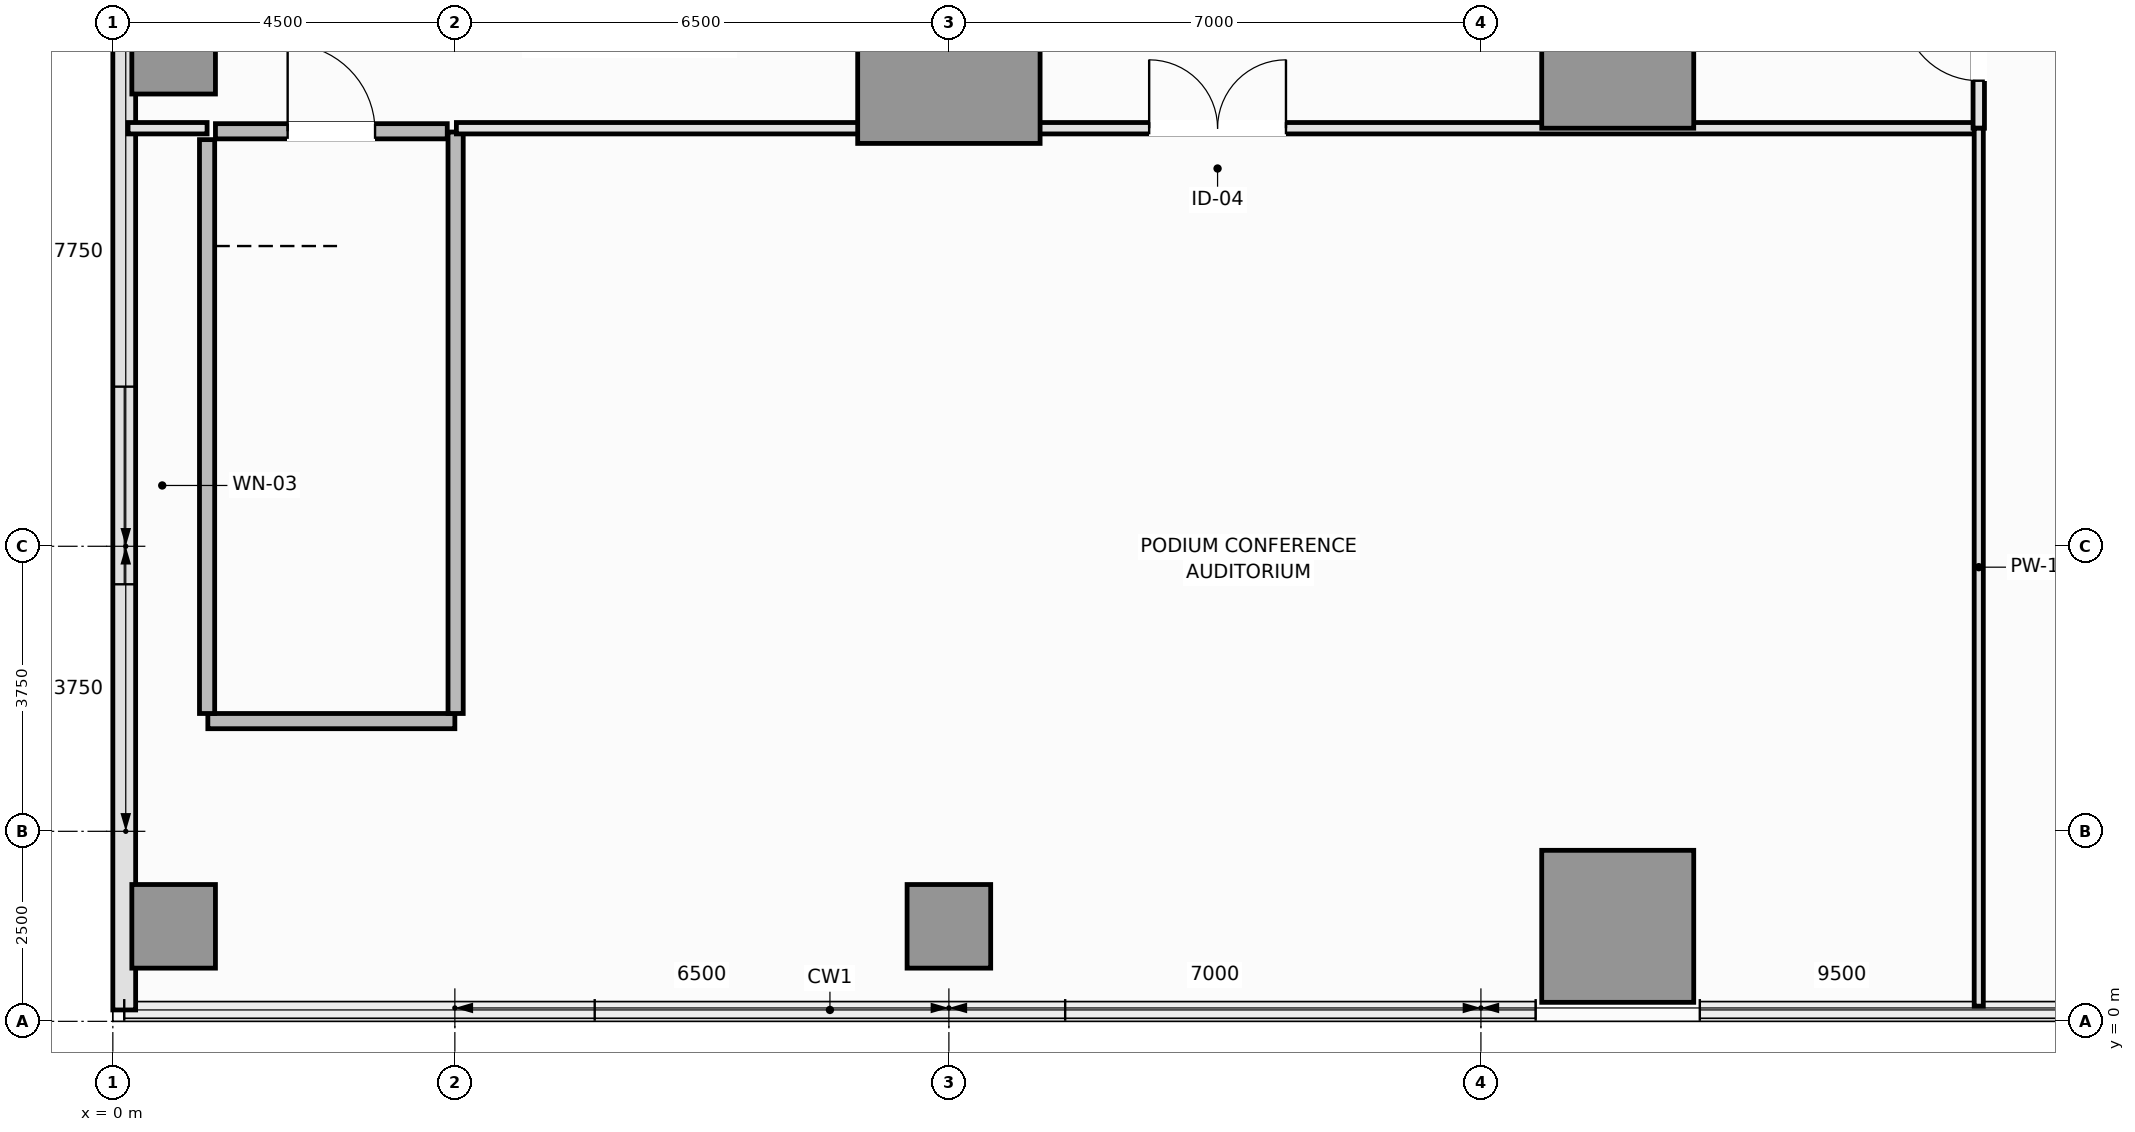
"""IFC4 building model, lengths in metres.
Left out: names, types, materials, properties, quantities, classifications, styles, units other than length and angle.
Written with IfcOpenShell. Run it as: python <this file> out.ifc"""

import sys

from ifc_helpers import new_model, si_unit, direction, frame, frame_2d, origin, origin_2d, place, context, subcontext, project, spatial, rectangle, extrude, element, fill, save


model = new_model("IFC4")
c1 = context("Model", 3, precision=1e-05, world=origin(), true_north=direction((0.0, 1.0)))
c2 = subcontext(c1, "Body", "Model", "MODEL_VIEW")
j1 = project(units=[si_unit("LENGTHUNIT", "METRE"), si_unit("PLANEANGLEUNIT", "RADIAN")], contexts=[c1])
p1 = place(None, origin())
s1 = spatial("IfcSite", under=j1, at=p1, CompositionType="ELEMENT")
p2 = place(p1, origin())
s2 = spatial("IfcBuilding", under=s1, at=p2, CompositionType="ELEMENT")
p3 = place(p2, frame((0.0, 0.0, 20.4)))
s3 = spatial("IfcBuildingStorey", under=s2, at=p3, CompositionType="ELEMENT", Elevation=20.4)
p4 = place(p3, frame((11.0, 12.75, 0.0), z_axis=(0.0, 0.0, 1.0), x_axis=(1.0, 0.0, 0.0)))
e1 = element("IfcColumn", 1, at=p4, inside=s3, PredefinedType="COLUMN", context=c2, shape_type="SweptSolid", body=[
    extrude(rectangle(XDim=2.4, YDim=2.4, at=origin_2d()), origin(), (0.0, 0.0, 1.0), 5.2),
])
for number, where, z_axis, x_axis in (
    (2, (19.8, 1.25, 0.0), (0.0, 0.0, 1.0), (1.0, 0.0, 0.0)),
    (3, (19.8, 12.75, 0.0), (0.0, 0.0, 1.0), (1.0, 0.0, 0.0)),
):
    element("IfcColumn", number, at=place(p3, frame(where, z_axis=z_axis, x_axis=x_axis)), inside=s3, PredefinedType="COLUMN", context=c2, shape_type="SweptSolid", body=[
        extrude(rectangle(XDim=2.0, YDim=2.0, at=origin_2d()), origin(), (0.0, 0.0, 1.0), 5.2),
    ])
for number, where, z_axis, x_axis in (
    (4, (0.8, 1.25, 0.0), (0.0, 0.0, 1.0), (1.0, 0.0, 0.0)),
    (5, (0.8, 12.75, 0.0), (0.0, 0.0, 1.0), (1.0, 0.0, 0.0)),
    (6, (11.0, 1.25, 0.0), (0.0, 0.0, 1.0), (1.0, 0.0, 0.0)),
):
    element("IfcColumn", number, at=place(p3, frame(where, z_axis=z_axis, x_axis=x_axis)), inside=s3, PredefinedType="COLUMN", context=c2, shape_type="SweptSolid", body=[
        extrude(rectangle(XDim=1.1, YDim=1.1, at=origin_2d()), origin(), (0.0, 0.0, 1.0), 5.2),
    ])
p5 = place(p3, frame((0.15, 50.35, 0.0), z_axis=(0.0, 0.0, 1.0), x_axis=(0.0, -1.0, 0.0)))
e7 = element("IfcWall", 7, at=p5, inside=s3, PredefinedType="SOLIDWALL", context=c2, shape_type="SweptSolid", body=[
    extrude(rectangle(XDim=50.2, YDim=0.3, at=frame_2d((25.1, 0.0))), origin(), (0.0, 0.0, 1.0), 5.02),
])
p6 = place(p5, frame((6.5, 0.0, 0.9)))
e8 = element("IfcOpeningElement", 8, at=p6, cuts=e7, PredefinedType="OPENING", context=c2, shape_type="SweptSolid", body=[
    extrude(rectangle(XDim=2.6, YDim=2.2, at=frame_2d((1.3, 1.1))), frame((0.0, 0.16, 0.0), z_axis=(0.0, -1.0, 0.0), x_axis=(1.0, 0.0, 0.0)), (0.0, 0.0, 1.0), 0.32),
])
p7 = place(p5, frame((42.0, 0.0, 0.9)))
e9 = element("IfcOpeningElement", 9, at=p7, cuts=e7, PredefinedType="OPENING", context=c2, shape_type="SweptSolid", body=[
    extrude(rectangle(XDim=2.6, YDim=2.2, at=frame_2d((1.3, 1.1))), frame((0.0, 0.16, 0.0), z_axis=(0.0, -1.0, 0.0), x_axis=(1.0, 0.0, 0.0)), (0.0, 0.0, 1.0), 0.32),
])
p8 = place(p3, frame((1.25, 3.95, 0.0), z_axis=(0.0, 0.0, 1.0), x_axis=(1.0, 0.0, 0.0)))
e10 = element("IfcWall", 10, at=p8, inside=s3, PredefinedType="SOLIDWALL", context=c2, shape_type="SweptSolid", body=[
    extrude(rectangle(XDim=3.25, YDim=0.2, at=frame_2d((1.625, 0.0))), origin(), (0.0, 0.0, 1.0), 5.2),
])
p9 = place(p3, frame((1.24, 4.05, 0.0), z_axis=(0.0, 0.0, 1.0), x_axis=(0.0, 1.0, 0.0)))
e11 = element("IfcWall", 11, at=p9, inside=s3, PredefinedType="SOLIDWALL", context=c2, shape_type="SweptSolid", body=[
    extrude(rectangle(XDim=7.55, YDim=0.2, at=frame_2d((3.775, 0.0))), origin(), (0.0, 0.0, 1.0), 5.2),
])
p10 = place(p3, frame((4.51, 4.05, 0.0), z_axis=(0.0, 0.0, 1.0), x_axis=(0.0, 1.0, 0.0)))
e12 = element("IfcWall", 12, at=p10, inside=s3, PredefinedType="SOLIDWALL", context=c2, shape_type="SweptSolid", body=[
    extrude(rectangle(XDim=7.65, YDim=0.2, at=frame_2d((3.825, 0.0))), origin(), (0.0, 0.0, 1.0), 5.2),
])
p11 = place(p3, frame((1.35, 11.71, 0.0), z_axis=(0.0, 0.0, 1.0), x_axis=(1.0, 0.0, 0.0)))
e13 = element("IfcWall", 13, at=p11, inside=s3, PredefinedType="SOLIDWALL", context=c2, shape_type="SweptSolid", body=[
    extrude(rectangle(XDim=3.05, YDim=0.2, at=frame_2d((1.525, 0.0))), origin(), (0.0, 0.0, 1.0), 5.2),
])
p12 = place(p11, frame((0.95, 0.0, 0.0)))
e14 = element("IfcOpeningElement", 14, at=p12, cuts=e13, PredefinedType="OPENING", context=c2, shape_type="SweptSolid", body=[
    extrude(rectangle(XDim=1.15, YDim=2.15, at=frame_2d((0.575, 1.075))), frame((0.0, 0.11, 0.0), z_axis=(0.0, -1.0, 0.0), x_axis=(1.0, 0.0, 0.0)), (0.0, 0.0, 1.0), 0.22),
])
p13 = place(p3, frame((0.2, 11.75, 0.0), z_axis=(0.0, 0.0, 1.0), x_axis=(1.0, 0.0, 0.0)))
e15 = element("IfcWall", 15, at=p13, inside=s3, PredefinedType="PARTITIONING", context=c2, shape_type="SweptSolid", body=[
    extrude(rectangle(XDim=1.04, YDim=0.15, at=frame_2d((0.52, 0.0))), origin(), (0.0, 0.0, 1.0), 5.02),
])
p14 = place(p3, frame((4.52, 11.75, 0.0), z_axis=(0.0, 0.0, 1.0), x_axis=(1.0, 0.0, 0.0)))
e16 = element("IfcWall", 16, at=p14, inside=s3, PredefinedType="PARTITIONING", context=c2, shape_type="SweptSolid", body=[
    extrude(rectangle(XDim=20.03, YDim=0.15, at=frame_2d((10.015, 0.0))), origin(), (0.0, 0.0, 1.0), 5.02),
])
p15 = place(p14, frame((9.115, 0.0, 0.0)))
e17 = element("IfcOpeningElement", 17, at=p15, cuts=e16, PredefinedType="OPENING", context=c2, shape_type="SweptSolid", body=[
    extrude(rectangle(XDim=1.8, YDim=2.2, at=frame_2d((0.9, 1.1))), frame((0.0, 0.085, 0.0), z_axis=(0.0, -1.0, 0.0), x_axis=(1.0, 0.0, 0.0)), (0.0, 0.0, 1.0), 0.17),
])
p16 = place(p3, frame((24.55, 11.75, 0.0), z_axis=(0.0, 0.0, 1.0), x_axis=(0.0, 1.0, 0.0)))
e18 = element("IfcWall", 18, at=p16, inside=s3, PredefinedType="PARTITIONING", context=c2, shape_type="SweptSolid", body=[
    extrude(rectangle(XDim=2.25, YDim=0.15, at=frame_2d((1.125, 0.0))), origin(), (0.0, 0.0, 1.0), 5.02),
])
p17 = place(p16, frame((0.625, 0.0, 0.0)))
e19 = element("IfcOpeningElement", 19, at=p17, cuts=e18, PredefinedType="OPENING", context=c2, shape_type="SweptSolid", body=[
    extrude(rectangle(XDim=1.0, YDim=2.15, at=frame_2d((0.5, 1.075))), frame((0.0, 0.085, 0.0), z_axis=(0.0, -1.0, 0.0), x_axis=(1.0, 0.0, 0.0)), (0.0, 0.0, 1.0), 0.17),
])
p18 = place(p3, frame((24.55, 0.2, 0.0), z_axis=(0.0, 0.0, 1.0), x_axis=(0.0, 1.0, 0.0)))
e20 = element("IfcWall", 20, at=p18, inside=s3, PredefinedType="PARTITIONING", context=c2, shape_type="SweptSolid", body=[
    extrude(rectangle(XDim=11.55, YDim=0.12, at=frame_2d((5.775, 0.0))), origin(), (0.0, 0.0, 1.0), 5.02),
])
p19 = place(p7, origin())
e21 = element("IfcWindow", 21, at=p19, inside=s3, PartitioningType="SINGLE_PANEL", PredefinedType="WINDOW", context=c2, shape_type="SweptSolid", body=[
    extrude(rectangle(XDim=2.6, YDim=2.2, at=frame_2d((1.3, 1.1))), frame((0.0, 0.03, 0.0), z_axis=(0.0, -1.0, 0.0), x_axis=(1.0, 0.0, 0.0)), (0.0, 0.0, 1.0), 0.06),
])
fill(e9, e21)
p20 = place(p12, origin())
e22 = element("IfcDoor", 22, at=p20, inside=s3, OperationType="SINGLE_SWING_LEFT", PredefinedType="DOOR", context=c2, shape_type="SweptSolid", body=[
    extrude(rectangle(XDim=1.15, YDim=2.15, at=frame_2d((0.575, 1.075))), frame((0.0, 0.025, 0.0), z_axis=(0.0, -1.0, 0.0), x_axis=(1.0, 0.0, 0.0)), (0.0, 0.0, 1.0), 0.05),
])
fill(e14, e22)
p21 = place(p15, origin())
e23 = element("IfcDoor", 23, at=p21, inside=s3, OperationType="DOUBLE_DOOR_SINGLE_SWING", PredefinedType="DOOR", context=c2, shape_type="SweptSolid", body=[
    extrude(rectangle(XDim=1.8, YDim=2.2, at=frame_2d((0.9, 1.1))), frame((0.0, 0.025, 0.0), z_axis=(0.0, -1.0, 0.0), x_axis=(1.0, 0.0, 0.0)), (0.0, 0.0, 1.0), 0.05),
])
fill(e17, e23)
p22 = place(p17, origin())
e24 = element("IfcDoor", 24, at=p22, inside=s3, OperationType="SINGLE_SWING_RIGHT", PredefinedType="DOOR", context=c2, shape_type="SweptSolid", body=[
    extrude(rectangle(XDim=1.0, YDim=2.15, at=frame_2d((0.5, 1.075))), frame((0.0, 0.025, 0.0), z_axis=(0.0, -1.0, 0.0), x_axis=(1.0, 0.0, 0.0)), (0.0, 0.0, 1.0), 0.05),
])
fill(e19, e24)
save(model, sys.argv[1])
